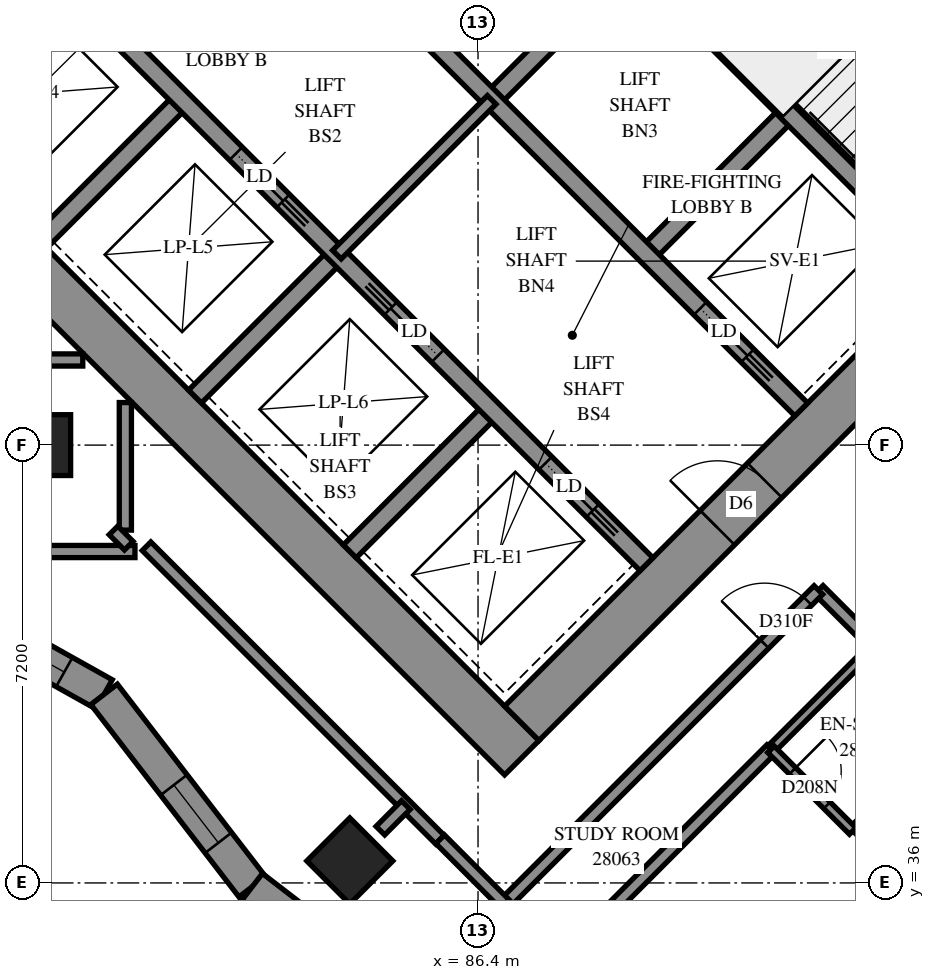
"""IFC4 building model, lengths in metres.
Left out: names, types, materials, properties, quantities, classifications, styles, units other than length and angle.
Written with IfcOpenShell. Run it as: python <this file> out.ifc"""

import sys

from ifc_helpers import new_model, si_unit, direction, frame, frame_2d, origin, origin_2d, place, context, subcontext, project, spatial, polyline, rectangle, outline, extrude, element, fill, save


model = new_model("IFC4")
c1 = context("Model", 3, precision=1e-05, world=origin(), true_north=direction((0.0, 1.0)))
c2 = subcontext(c1, "Body", "Model", "MODEL_VIEW")
j1 = project(units=[si_unit("LENGTHUNIT", "METRE"), si_unit("PLANEANGLEUNIT", "RADIAN")], contexts=[c1])
p1 = place(None, origin())
s1 = spatial("IfcSite", under=j1, at=p1, CompositionType="ELEMENT")
p2 = place(p1, origin())
s2 = spatial("IfcBuilding", under=s1, at=p2, CompositionType="ELEMENT")
p3 = place(p2, frame((0.0, 0.0, 105.0)))
s3 = spatial("IfcBuildingStorey", under=s2, at=p3, CompositionType="ELEMENT", Elevation=105.0)
for number, where, z_axis, x_axis in (
    (1, (79.2, 43.2, 0.0), (0.0, 0.0, 1.0), (1.0, 0.0, 0.0)),
    (2, (84.291, 36.362, 0.0), (0.0, 0.0, 1.0), (0.707, -0.707, 0.0)),
):
    element("IfcColumn", number, at=place(p3, frame(where, z_axis=z_axis, x_axis=x_axis)), inside=s3, PredefinedType="COLUMN", context=c2, shape_type="SweptSolid", body=[
        extrude(rectangle(XDim=1.0, YDim=1.0, at=origin_2d()), origin(), (0.0, 0.0, 1.0), 3.1),
    ])
p4 = place(p3, frame((75.806, 49.373, -0.3), z_axis=(0.0, 0.0, 1.0), x_axis=(0.7071067812, -0.7071067812, 0.0)))
e3 = element("IfcWall", 3, at=p4, inside=s3, PredefinedType="SHEAR", context=c2, shape_type="SweptSolid", body=[
    extrude(rectangle(XDim=16.0, YDim=0.8, at=frame_2d((8.0, 0.0))), origin(), (0.0, 0.0, 1.0), 2.7),
])
p5 = place(p3, frame((86.554, 60.121, -0.3), z_axis=(0.0, 0.0, 1.0), x_axis=(0.7071067812, -0.7071067812, 0.0)))
e4 = element("IfcWall", 4, at=p5, inside=s3, PredefinedType="SHEAR", context=c2, shape_type="SweptSolid", body=[
    extrude(rectangle(XDim=16.0, YDim=0.8, at=frame_2d((8.0, 0.0))), origin(), (0.0, 0.0, 1.0), 2.7),
])
p6 = place(p5, frame((10.8, 0.0, 0.3)))
e5 = element("IfcOpeningElement", 5, at=p6, cuts=e4, PredefinedType="OPENING", context=c2, shape_type="SweptSolid", body=[
    extrude(rectangle(XDim=0.8, YDim=2.1, at=frame_2d((0.4, 1.05))), frame((0.0, 0.41, 0.0), z_axis=(0.0, -1.0, 0.0), x_axis=(1.0, 0.0, 0.0)), (0.0, 0.0, 1.0), 0.82),
])
p7 = place(p3, frame((76.372, 49.373, -0.3), z_axis=(0.0, 0.0, 1.0), x_axis=(0.7071067812, 0.7071067812, 0.0)))
e6 = element("IfcWall", 6, at=p7, inside=s3, PredefinedType="SHEAR", context=c2, shape_type="SweptSolid", body=[
    extrude(rectangle(XDim=14.4, YDim=0.8, at=frame_2d((7.2, 0.0))), origin(), (0.0, 0.0, 1.0), 2.7),
])
p8 = place(p7, frame((4.55, 0.0, 0.3)))
e7 = element("IfcOpeningElement", 7, at=p8, cuts=e6, PredefinedType="OPENING", context=c2, shape_type="SweptSolid", body=[
    extrude(rectangle(XDim=1.1, YDim=2.1, at=frame_2d((0.55, 1.05))), frame((0.0, 0.41, 0.0), z_axis=(0.0, -1.0, 0.0), x_axis=(1.0, 0.0, 0.0)), (0.0, 0.0, 1.0), 0.82),
])
p9 = place(p7, frame((11.35, 0.0, 0.3)))
e8 = element("IfcOpeningElement", 8, at=p9, cuts=e6, PredefinedType="OPENING", context=c2, shape_type="SweptSolid", body=[
    extrude(rectangle(XDim=1.1, YDim=2.1, at=frame_2d((0.55, 1.05))), frame((0.0, 0.41, 0.0), z_axis=(0.0, -1.0, 0.0), x_axis=(1.0, 0.0, 0.0)), (0.0, 0.0, 1.0), 0.82),
])
p10 = place(p3, frame((87.12, 38.625, -0.3), z_axis=(0.0, 0.0, 1.0), x_axis=(0.7071067812, 0.7071067812, 0.0)))
e9 = element("IfcWall", 9, at=p10, inside=s3, PredefinedType="SHEAR", context=c2, shape_type="SweptSolid", body=[
    extrude(rectangle(XDim=14.4, YDim=0.8, at=frame_2d((7.2, 0.0))), origin(), (0.0, 0.0, 1.0), 2.7),
])
p11 = place(p10, frame((4.55, 0.0, 0.3)))
e10 = element("IfcOpeningElement", 10, at=p11, cuts=e9, PredefinedType="OPENING", context=c2, shape_type="SweptSolid", body=[
    extrude(rectangle(XDim=1.1, YDim=2.1, at=frame_2d((0.55, 1.05))), frame((0.0, 0.41, 0.0), z_axis=(0.0, -1.0, 0.0), x_axis=(1.0, 0.0, 0.0)), (0.0, 0.0, 1.0), 0.82),
])
p12 = place(p10, frame((11.35, 0.0, 0.3)))
e11 = element("IfcOpeningElement", 11, at=p12, cuts=e9, PredefinedType="OPENING", context=c2, shape_type="SweptSolid", body=[
    extrude(rectangle(XDim=1.1, YDim=2.1, at=frame_2d((0.55, 1.05))), frame((0.0, 0.41, 0.0), z_axis=(0.0, -1.0, 0.0), x_axis=(1.0, 0.0, 0.0)), (0.0, 0.0, 1.0), 0.82),
])
p13 = place(p3, frame((79.2, 46.544, 0.0), z_axis=(0.0, 0.0, 1.0), x_axis=(0.7071219326, 0.7070916295, 0.0)))
e12 = element("IfcWall", 12, at=p13, inside=s3, PredefinedType="SOLIDWALL", context=c2, shape_type="SweptSolid", body=[
    extrude(rectangle(XDim=3.3, YDim=0.3, at=frame_2d((1.65, 0.0))), origin(), (0.0, 0.0, 1.0), 3.1),
])
p14 = place(p3, frame((81.746, 43.999, 0.0), z_axis=(0.0, 0.0, 1.0), x_axis=(0.7071067812, 0.7071067812, 0.0)))
e13 = element("IfcWall", 13, at=p14, inside=s3, PredefinedType="SOLIDWALL", context=c2, shape_type="SweptSolid", body=[
    extrude(rectangle(XDim=3.3, YDim=0.3, at=frame_2d((1.65, 0.0))), origin(), (0.0, 0.0, 1.0), 3.1),
])
p15 = place(p3, frame((86.625, 48.878, 0.0), z_axis=(0.0, 0.0, 1.0), x_axis=(0.7071067812, 0.7071067812, 0.0)))
e14 = element("IfcWall", 14, at=p15, inside=s3, PredefinedType="SOLIDWALL", context=c2, shape_type="SweptSolid", body=[
    extrude(rectangle(XDim=3.3, YDim=0.3, at=frame_2d((1.65, 0.0))), origin(), (0.0, 0.0, 1.0), 3.1),
])
p16 = place(p3, frame((84.291, 41.453, 0.0), z_axis=(0.0, 0.0, 1.0), x_axis=(0.7071067812, 0.7071067812, 0.0)))
e15 = element("IfcWall", 15, at=p16, inside=s3, PredefinedType="SOLIDWALL", context=c2, shape_type="SweptSolid", body=[
    extrude(rectangle(XDim=3.3, YDim=0.3, at=frame_2d((1.65, 0.0))), origin(), (0.0, 0.0, 1.0), 3.1),
])
p17 = place(p3, frame((89.17, 46.332, 0.0), z_axis=(0.0, 0.0, 1.0), x_axis=(0.7071067812, 0.7071067812, 0.0)))
e16 = element("IfcWall", 16, at=p17, inside=s3, PredefinedType="SOLIDWALL", context=c2, shape_type="SweptSolid", body=[
    extrude(rectangle(XDim=3.3, YDim=0.3, at=frame_2d((1.65, 0.0))), origin(), (0.0, 0.0, 1.0), 3.1),
])
p18 = place(p3, frame((78.988, 51.423, 0.0), z_axis=(0.0, 0.0, 1.0), x_axis=(0.7071067812, -0.7071067812, 0.0)))
e17 = element("IfcWall", 17, at=p18, inside=s3, PredefinedType="SOLIDWALL", context=c2, shape_type="SweptSolid", body=[
    extrude(rectangle(XDim=14.4, YDim=0.3, at=frame_2d((7.2, 0.0))), origin(), (0.0, 0.0, 1.0), 3.1),
])
p19 = place(p18, frame((1.25, 0.0, 0.0)))
e18 = element("IfcOpeningElement", 18, at=p19, cuts=e17, PredefinedType="OPENING", context=c2, shape_type="SweptSolid", body=[
    extrude(rectangle(XDim=1.1, YDim=2.1, at=frame_2d((0.55, 1.05))), frame((0.0, 0.16, 0.0), z_axis=(0.0, -1.0, 0.0), x_axis=(1.0, 0.0, 0.0)), (0.0, 0.0, 1.0), 0.32),
])
p20 = place(p18, frame((4.85, 0.0, 0.0)))
e19 = element("IfcOpeningElement", 19, at=p20, cuts=e17, PredefinedType="OPENING", context=c2, shape_type="SweptSolid", body=[
    extrude(rectangle(XDim=1.1, YDim=2.1, at=frame_2d((0.55, 1.05))), frame((0.0, 0.16, 0.0), z_axis=(0.0, -1.0, 0.0), x_axis=(1.0, 0.0, 0.0)), (0.0, 0.0, 1.0), 0.32),
])
p21 = place(p18, frame((8.45, 0.0, 0.0)))
e20 = element("IfcOpeningElement", 20, at=p21, cuts=e17, PredefinedType="OPENING", context=c2, shape_type="SweptSolid", body=[
    extrude(rectangle(XDim=1.1, YDim=2.1, at=frame_2d((0.55, 1.05))), frame((0.0, 0.16, 0.0), z_axis=(0.0, -1.0, 0.0), x_axis=(1.0, 0.0, 0.0)), (0.0, 0.0, 1.0), 0.32),
])
p22 = place(p18, frame((12.05, 0.0, 0.0)))
e21 = element("IfcOpeningElement", 21, at=p22, cuts=e17, PredefinedType="OPENING", context=c2, shape_type="SweptSolid", body=[
    extrude(rectangle(XDim=1.1, YDim=2.1, at=frame_2d((0.55, 1.05))), frame((0.0, 0.16, 0.0), z_axis=(0.0, -1.0, 0.0), x_axis=(1.0, 0.0, 0.0)), (0.0, 0.0, 1.0), 0.32),
])
p23 = place(p3, frame((81.534, 53.969, 0.0), z_axis=(0.0, 0.0, 1.0), x_axis=(0.707103309, -0.7071102534, 0.0)))
e22 = element("IfcWall", 22, at=p23, inside=s3, PredefinedType="SOLIDWALL", context=c2, shape_type="SweptSolid", body=[
    extrude(rectangle(XDim=14.4, YDim=0.3, at=frame_2d((7.2, 0.0))), origin(), (0.0, 0.0, 1.0), 3.1),
])
p24 = place(p23, frame((12.05, 0.0, 0.0)))
e23 = element("IfcOpeningElement", 23, at=p24, cuts=e22, PredefinedType="OPENING", context=c2, shape_type="SweptSolid", body=[
    extrude(rectangle(XDim=1.1, YDim=2.1, at=frame_2d((0.55, 1.05))), frame((0.0, 0.16, 0.0), z_axis=(0.0, -1.0, 0.0), x_axis=(1.0, 0.0, 0.0)), (0.0, 0.0, 1.0), 0.32),
])
p25 = place(p3, frame((88.958, 51.211, 0.0), z_axis=(0.0, 0.0, 1.0), x_axis=(0.7070998367, -0.7071137256, 0.0)))
e24 = element("IfcWall", 24, at=p25, inside=s3, PredefinedType="SOLIDWALL", context=c2, shape_type="SweptSolid", body=[
    extrude(rectangle(XDim=7.2, YDim=0.3, at=frame_2d((3.6, 0.0))), origin(), (0.0, 0.0, 1.0), 3.1),
])
p26 = place(p3, frame((76.606, 41.141, 0.0), z_axis=(0.0, 0.0, 1.0), x_axis=(0.8726248074, -0.4883911809, 0.0)))
e25 = element("IfcWall", 25, at=p26, inside=s3, PredefinedType="SOLIDWALL", context=c2, shape_type="SweptSolid", body=[
    extrude(outline(polyline([(0.027, -0.275), (4.12, -0.275), (4.233, 0.275), (-0.027, 0.275), (0.027, -0.275)])), origin(), (0.0, 0.0, 1.0), 3.1),
])
p27 = place(p26, frame((0.338, 0.0, 0.5)))
e26 = element("IfcOpeningElement", 26, at=p27, cuts=e25, PredefinedType="OPENING", context=c2, shape_type="SweptSolid", body=[
    extrude(rectangle(XDim=1.2, YDim=2.45, at=frame_2d((0.6, 1.225))), frame((0.0, 0.285, 0.0), z_axis=(0.0, -1.0, 0.0), x_axis=(1.0, 0.0, 0.0)), (0.0, 0.0, 1.0), 0.57),
])
p28 = place(p26, frame((2.227, 0.0, 0.5)))
e27 = element("IfcOpeningElement", 27, at=p28, cuts=e25, PredefinedType="OPENING", context=c2, shape_type="SweptSolid", body=[
    extrude(rectangle(XDim=1.2, YDim=2.45, at=frame_2d((0.6, 1.225))), frame((0.0, 0.285, 0.0), z_axis=(0.0, -1.0, 0.0), x_axis=(1.0, 0.0, 0.0)), (0.0, 0.0, 1.0), 0.57),
])
p29 = place(p3, frame((80.251, 39.101, 0.0), z_axis=(0.0, 0.0, 1.0), x_axis=(0.6100580662, -0.79235671, 0.0)))
e28 = element("IfcWall", 28, at=p29, inside=s3, PredefinedType="SOLIDWALL", context=c2, shape_type="SweptSolid", body=[
    extrude(outline(polyline([(0.056, -0.275), (4.029, -0.275), (3.957, 0.275), (-0.056, 0.275), (0.056, -0.275)])), origin(), (0.0, 0.0, 1.0), 3.1),
])
p30 = place(p29, frame((1.881, 0.0, 0.5)))
e29 = element("IfcOpeningElement", 29, at=p30, cuts=e28, PredefinedType="OPENING", context=c2, shape_type="SweptSolid", body=[
    extrude(rectangle(XDim=1.2, YDim=2.45, at=frame_2d((0.6, 1.225))), frame((0.0, 0.285, 0.0), z_axis=(0.0, -1.0, 0.0), x_axis=(1.0, 0.0, 0.0)), (0.0, 0.0, 1.0), 0.57),
])
p31 = place(p3, frame((82.686, 35.938, 0.0), z_axis=(0.0, 0.0, 1.0), x_axis=(0.7923534452, -0.6100623066, 0.0)))
e30 = element("IfcWall", 30, at=p31, inside=s3, PredefinedType="SOLIDWALL", context=c2, shape_type="SweptSolid", body=[
    extrude(outline(polyline([(-0.036, -0.275), (3.937, -0.275), (4.008, 0.275), (0.036, 0.275), (-0.036, -0.275)])), origin(), (0.0, 0.0, 1.0), 3.1),
])
p32 = place(p31, frame((1.707, 0.0, 0.5)))
e31 = element("IfcOpeningElement", 31, at=p32, cuts=e30, PredefinedType="OPENING", context=c2, shape_type="SweptSolid", body=[
    extrude(rectangle(XDim=1.2, YDim=2.45, at=frame_2d((0.6, 1.225))), frame((0.0, 0.285, 0.0), z_axis=(0.0, -1.0, 0.0), x_axis=(1.0, 0.0, 0.0)), (0.0, 0.0, 1.0), 0.57),
])
p33 = place(p3, frame((91.313, 53.354, 0.0), z_axis=(0.0, 0.0, 1.0), x_axis=(0.7071067812, -0.7071067812, 0.0)))
e32 = element("IfcWall", 32, at=p33, inside=s3, PredefinedType="PARTITIONING", context=c2, shape_type="SweptSolid", body=[
    extrude(rectangle(XDim=5.95, YDim=0.15, at=frame_2d((2.975, 0.0))), origin(), (0.0, 0.0, 1.0), 3.1),
])
p34 = place(p3, frame((84.079, 46.332, 0.0), z_axis=(0.0, 0.0, 1.0), x_axis=(0.7071067812, 0.7071067812, 0.0)))
e33 = element("IfcWall", 33, at=p34, inside=s3, PredefinedType="PARTITIONING", context=c2, shape_type="SweptSolid", body=[
    extrude(rectangle(XDim=3.6, YDim=0.2, at=frame_2d((1.8, 0.0))), origin(), (0.0, 0.0, 1.0), 3.1),
])
p35 = place(p3, frame((92.004, 40.819, 0.0), z_axis=(0.0, 0.0, 1.0), x_axis=(0.7071067812, -0.7071067812, 0.0)))
e34 = element("IfcWall", 34, at=p35, inside=s3, PredefinedType="PARTITIONING", context=c2, shape_type="SweptSolid", body=[
    extrude(rectangle(XDim=19.298, YDim=0.2, at=frame_2d((9.649, 0.0))), origin(), (0.0, 0.0, 1.0), 3.1),
])
p36 = place(p35, frame((3.489, 0.0, 0.0)))
e35 = element("IfcOpeningElement", 35, at=p36, cuts=e34, PredefinedType="OPENING", context=c2, shape_type="SweptSolid", body=[
    extrude(rectangle(XDim=0.9, YDim=2.1, at=frame_2d((0.45, 1.05))), frame((0.0, 0.11, 0.0), z_axis=(0.0, -1.0, 0.0), x_axis=(1.0, 0.0, 0.0)), (0.0, 0.0, 1.0), 0.22),
])
p37 = place(p35, frame((9.319, 0.0, 0.0)))
e36 = element("IfcOpeningElement", 36, at=p37, cuts=e34, PredefinedType="OPENING", context=c2, shape_type="SweptSolid", body=[
    extrude(rectangle(XDim=0.9, YDim=2.1, at=frame_2d((0.45, 1.05))), frame((0.0, 0.11, 0.0), z_axis=(0.0, -1.0, 0.0), x_axis=(1.0, 0.0, 0.0)), (0.0, 0.0, 1.0), 0.22),
])
p38 = place(p35, frame((15.961, 0.0, 0.0)))
e37 = element("IfcOpeningElement", 37, at=p38, cuts=e34, PredefinedType="OPENING", context=c2, shape_type="SweptSolid", body=[
    extrude(rectangle(XDim=0.9, YDim=2.1, at=frame_2d((0.45, 1.05))), frame((0.0, 0.11, 0.0), z_axis=(0.0, -1.0, 0.0), x_axis=(1.0, 0.0, 0.0)), (0.0, 0.0, 1.0), 0.22),
])
p39 = place(p3, frame((86.835, 35.655, 0.0), z_axis=(0.0, 0.0, 1.0), x_axis=(0.7071067812, 0.7071067812, 0.0)))
e38 = element("IfcWall", 38, at=p39, inside=s3, PredefinedType="PARTITIONING", context=c2, shape_type="SweptSolid", body=[
    extrude(rectangle(XDim=7.3, YDim=0.2, at=frame_2d((3.65, 0.0))), origin(), (0.0, 0.0, 1.0), 3.1),
])
p40 = place(p39, frame((6.046, 0.0, 0.0)))
e39 = element("IfcOpeningElement", 39, at=p40, cuts=e38, PredefinedType="OPENING", context=c2, shape_type="SweptSolid", body=[
    extrude(rectangle(XDim=1.0, YDim=2.1, at=frame_2d((0.5, 1.05))), frame((0.0, 0.11, 0.0), z_axis=(0.0, -1.0, 0.0), x_axis=(1.0, 0.0, 0.0)), (0.0, 0.0, 1.0), 0.22),
])
p41 = place(p3, frame((86.336, 33.313, 0.0), z_axis=(0.0, 0.0, 1.0), x_axis=(0.7069620306, 0.7072515022, 0.0)))
e40 = element("IfcWall", 40, at=p41, inside=s3, PredefinedType="PARTITIONING", context=c2, shape_type="SweptSolid", body=[
    extrude(rectangle(XDim=6.909, YDim=0.2, at=frame_2d((3.454, 0.0))), origin(), (0.0, 0.0, 1.0), 3.1),
])
p42 = place(p3, frame((80.948, 41.536, 0.0), z_axis=(0.0, 0.0, 1.0), x_axis=(0.7071067812, -0.7071067812, 0.0)))
e41 = element("IfcWall", 41, at=p42, inside=s3, PredefinedType="PARTITIONING", context=c2, shape_type="SweptSolid", body=[
    extrude(rectangle(XDim=6.822, YDim=0.2, at=frame_2d((3.411, 0.0))), origin(), (0.0, 0.0, 1.0), 3.1),
])
p43 = place(p3, frame((89.881, 31.771, 0.0), z_axis=(0.0, 0.0, 1.0), x_axis=(0.7071067812, 0.7071067812, 0.0)))
e42 = element("IfcWall", 42, at=p43, inside=s3, PredefinedType="PARTITIONING", context=c2, shape_type="SweptSolid", body=[
    extrude(rectangle(XDim=5.787, YDim=0.2, at=frame_2d((2.893, 0.0))), origin(), (0.0, 0.0, 1.0), 3.1),
])
for number, where, z_axis, x_axis in (
    (43, (92.563, 36.857, 0.0), (0.0, 0.0, 1.0), (0.707, 0.707, 0.0)),
    (44, (91.219, 38.201, 0.0), (0.0, 0.0, 1.0), (0.707, 0.707, 0.0)),
):
    element("IfcWall", number, at=place(p3, frame(where, z_axis=z_axis, x_axis=x_axis)), inside=s3, PredefinedType="PARTITIONING", context=c2, shape_type="SweptSolid", body=[
        extrude(rectangle(XDim=2.401, YDim=0.15, at=frame_2d((1.201, 0.0))), origin(), (0.0, 0.0, 1.0), 3.1),
    ])
for number, where, z_axis, x_axis in (
    (45, (77.802, 44.6, 0.0), (0.0, 0.0, 1.0), (1.0, 0.0, 0.0)),
    (46, (80.6, 41.802, 0.0), (0.0, 0.0, 1.0), (0.0, 1.0, 0.0)),
):
    element("IfcWall", number, at=place(p3, frame(where, z_axis=z_axis, x_axis=x_axis)), inside=s3, PredefinedType="PARTITIONING", context=c2, shape_type="SweptSolid", body=[
        extrude(rectangle(XDim=2.098, YDim=0.2, at=frame_2d((1.049, 0.0))), origin(), (0.0, 0.0, 1.0), 3.1),
    ])
p44 = place(p3, frame((91.217, 38.197, 0.0), z_axis=(0.0, 0.0, 1.0), x_axis=(0.7071067812, -0.7071067812, 0.0)))
e47 = element("IfcWall", 47, at=p44, inside=s3, PredefinedType="PARTITIONING", context=c2, shape_type="SweptSolid", body=[
    extrude(rectangle(XDim=1.901, YDim=0.15, at=frame_2d((0.95, 0.0))), origin(), (0.0, 0.0, 1.0), 3.1),
])
p45 = place(p44, frame((0.502, 0.0, 0.0)))
e48 = element("IfcOpeningElement", 48, at=p45, cuts=e47, PredefinedType="OPENING", context=c2, shape_type="SweptSolid", body=[
    extrude(rectangle(XDim=0.8, YDim=2.1, at=frame_2d((0.4, 1.05))), frame((0.0, 0.085, 0.0), z_axis=(0.0, -1.0, 0.0), x_axis=(1.0, 0.0, 0.0)), (0.0, 0.0, 1.0), 0.17),
])
p46 = place(p3, frame((79.198, 41.45, 0.0), z_axis=(0.0, 0.0, 1.0), x_axis=(1.0, 0.0, 0.0)))
e49 = element("IfcWall", 49, at=p46, inside=s3, PredefinedType="PARTITIONING", context=c2, shape_type="SweptSolid", body=[
    extrude(rectangle(XDim=1.56, YDim=0.2, at=frame_2d((0.78, 0.0))), origin(), (0.0, 0.0, 1.0), 3.1),
])
p47 = place(p3, frame((85.778, 36.718, 0.0), z_axis=(0.0, 0.0, 1.0), x_axis=(0.7064400143, -0.70777292, 0.0)))
e50 = element("IfcWall", 50, at=p47, inside=s3, PredefinedType="PARTITIONING", context=c2, shape_type="SweptSolid", body=[
    extrude(rectangle(XDim=1.5, YDim=0.2, at=frame_2d((0.75, 0.0))), origin(), (0.0, 0.0, 1.0), 3.1),
])
p48 = place(p3, frame((84.794, 36.86, 0.0), z_axis=(0.0, 0.0, 1.0), x_axis=(0.7054171665, 0.7087923682, 0.0)))
e51 = element("IfcWall", 51, at=p48, inside=s3, PredefinedType="PARTITIONING", context=c2, shape_type="SweptSolid", body=[
    extrude(rectangle(XDim=0.593, YDim=0.2, at=frame_2d((0.296, 0.0))), origin(), (0.0, 0.0, 1.0), 3.1),
])
p49 = place(p3, frame((80.405, 41.797, 0.0), z_axis=(0.0, 0.0, 1.0), x_axis=(0.7071067812, -0.7071067812, 0.0)))
e52 = element("IfcWall", 52, at=p49, inside=s3, PredefinedType="PARTITIONING", context=c2, shape_type="SweptSolid", body=[
    extrude(rectangle(XDim=0.355, YDim=0.2, at=frame_2d((0.177, 0.0))), origin(), (0.0, 0.0, 1.0), 3.1),
])
p50 = place(p28, origin())
e53 = element("IfcWindow", 53, at=p50, inside=s3, PartitioningType="SINGLE_PANEL", PredefinedType="WINDOW", context=c2, shape_type="SweptSolid", body=[
    extrude(rectangle(XDim=1.2, YDim=2.45, at=frame_2d((0.6, 1.225))), frame((0.0, 0.155, 0.0), z_axis=(0.0, -1.0, 0.0), x_axis=(1.0, 0.0, 0.0)), (0.0, 0.0, 1.0), 0.06),
])
fill(e27, e53)
p51 = place(p30, origin())
e54 = element("IfcWindow", 54, at=p51, inside=s3, PartitioningType="SINGLE_PANEL", PredefinedType="WINDOW", context=c2, shape_type="SweptSolid", body=[
    extrude(rectangle(XDim=1.2, YDim=2.45, at=frame_2d((0.6, 1.225))), frame((0.0, 0.155, 0.0), z_axis=(0.0, -1.0, 0.0), x_axis=(1.0, 0.0, 0.0)), (0.0, 0.0, 1.0), 0.06),
])
fill(e29, e54)
p52 = place(p11, origin())
e55 = element("IfcDoor", 55, at=p52, inside=s3, OperationType="DOUBLE_DOOR_SINGLE_SWING", PredefinedType="DOOR", context=c2, shape_type="SweptSolid", body=[
    extrude(rectangle(XDim=1.1, YDim=2.1, at=frame_2d((0.55, 1.05))), frame((0.0, 0.025, 0.0), z_axis=(0.0, -1.0, 0.0), x_axis=(1.0, 0.0, 0.0)), (0.0, 0.0, 1.0), 0.05),
])
fill(e10, e55)
p53 = place(p20, origin())
e56 = element("IfcDoor", 56, at=p53, inside=s3, OperationType="SLIDING_TO_RIGHT", PredefinedType="DOOR", context=c2, shape_type="SweptSolid", body=[
    extrude(rectangle(XDim=1.1, YDim=2.1, at=frame_2d((0.55, 1.05))), frame((0.0, 0.025, 0.0), z_axis=(0.0, -1.0, 0.0), x_axis=(1.0, 0.0, 0.0)), (0.0, 0.0, 1.0), 0.05),
])
fill(e19, e56)
p54 = place(p21, origin())
e57 = element("IfcDoor", 57, at=p54, inside=s3, OperationType="SLIDING_TO_LEFT", PredefinedType="DOOR", context=c2, shape_type="SweptSolid", body=[
    extrude(rectangle(XDim=1.1, YDim=2.1, at=frame_2d((0.55, 1.05))), frame((0.0, 0.025, 0.0), z_axis=(0.0, -1.0, 0.0), x_axis=(1.0, 0.0, 0.0)), (0.0, 0.0, 1.0), 0.05),
])
fill(e20, e57)
p55 = place(p22, origin())
e58 = element("IfcDoor", 58, at=p55, inside=s3, OperationType="SLIDING_TO_RIGHT", PredefinedType="DOOR", context=c2, shape_type="SweptSolid", body=[
    extrude(rectangle(XDim=1.1, YDim=2.1, at=frame_2d((0.55, 1.05))), frame((0.0, 0.025, 0.0), z_axis=(0.0, -1.0, 0.0), x_axis=(1.0, 0.0, 0.0)), (0.0, 0.0, 1.0), 0.05),
])
fill(e21, e58)
p56 = place(p24, origin())
e59 = element("IfcDoor", 59, at=p56, inside=s3, OperationType="SLIDING_TO_RIGHT", PredefinedType="DOOR", context=c2, shape_type="SweptSolid", body=[
    extrude(rectangle(XDim=1.1, YDim=2.1, at=frame_2d((0.55, 1.05))), frame((0.0, 0.025, 0.0), z_axis=(0.0, -1.0, 0.0), x_axis=(1.0, 0.0, 0.0)), (0.0, 0.0, 1.0), 0.05),
])
fill(e23, e59)
p57 = place(p40, origin())
e60 = element("IfcDoor", 60, at=p57, inside=s3, OperationType="SINGLE_SWING_RIGHT", PredefinedType="DOOR", context=c2, shape_type="SweptSolid", body=[
    extrude(rectangle(XDim=1.0, YDim=2.1, at=frame_2d((0.5, 1.05))), frame((0.0, 0.025, 0.0), z_axis=(0.0, -1.0, 0.0), x_axis=(1.0, 0.0, 0.0)), (0.0, 0.0, 1.0), 0.05),
])
fill(e39, e60)
p58 = place(p45, origin())
e61 = element("IfcDoor", 61, at=p58, inside=s3, OperationType="SINGLE_SWING_RIGHT", PredefinedType="DOOR", context=c2, shape_type="SweptSolid", body=[
    extrude(rectangle(XDim=0.8, YDim=2.1, at=frame_2d((0.4, 1.05))), frame((0.0, 0.025, 0.0), z_axis=(0.0, -1.0, 0.0), x_axis=(1.0, 0.0, 0.0)), (0.0, 0.0, 1.0), 0.05),
])
fill(e48, e61)
save(model, sys.argv[1])
